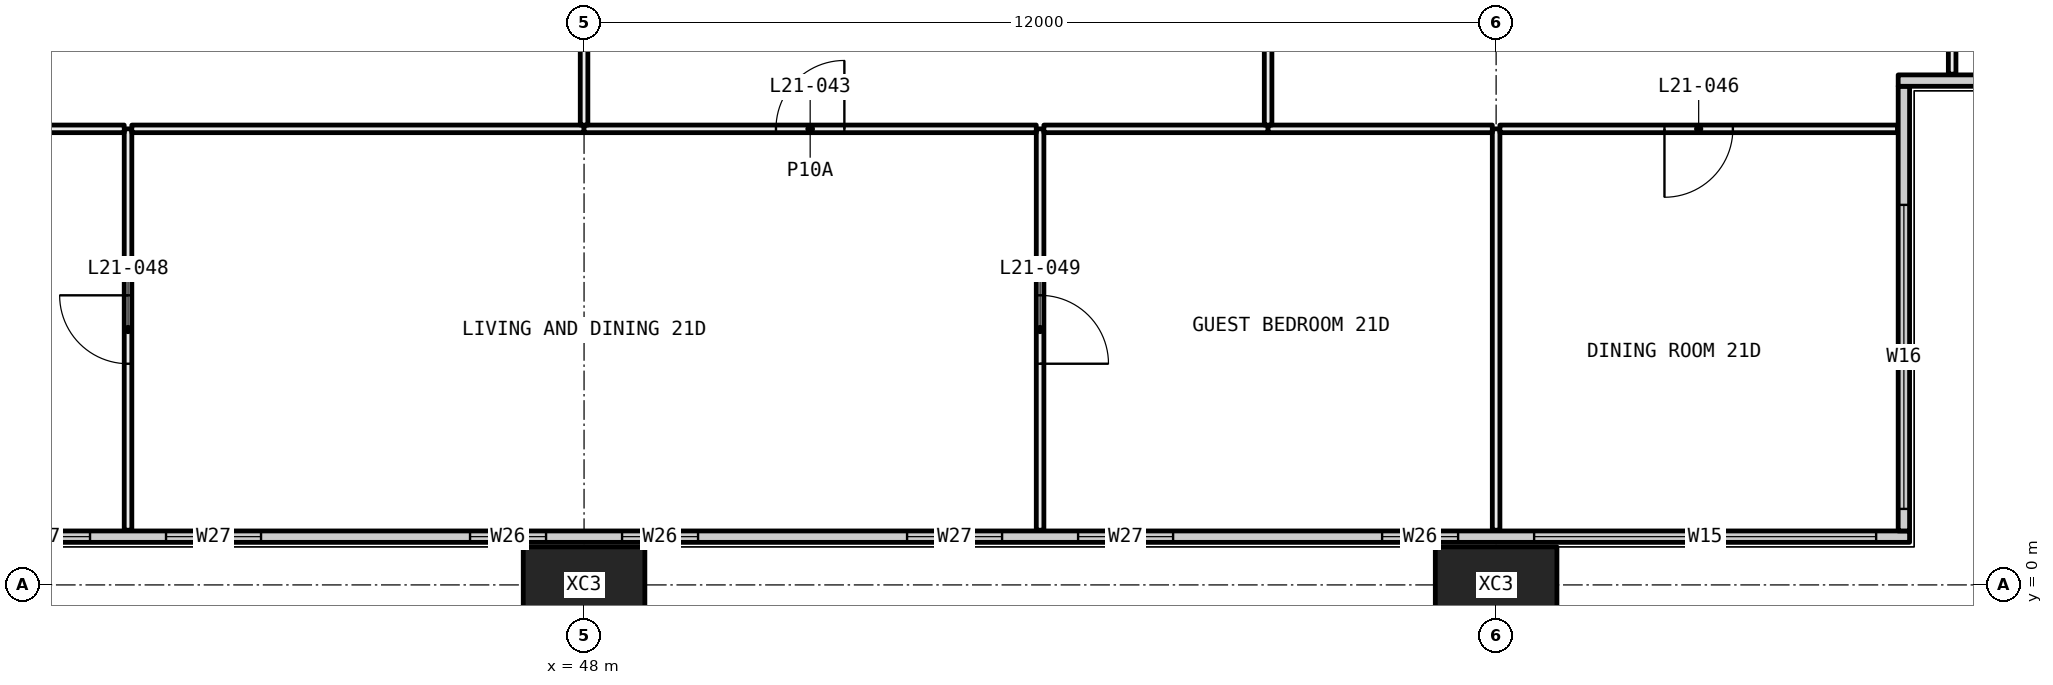
"""IFC4 building model, lengths in metres.
Left out: names, types, materials, properties, quantities, classifications, styles, units other than length and angle.
Written with IfcOpenShell. Run it as: python <this file> out.ifc"""

import sys

from ifc_helpers import new_model, si_unit, direction, frame, frame_2d, origin, origin_2d, place, context, subcontext, project, spatial, rectangle, hollow_rectangle, extrude, element, fill, save


model = new_model("IFC4")
c1 = context("Model", 3, precision=1e-05, world=origin(), true_north=direction((0.0, 1.0)))
c2 = subcontext(c1, "Body", "Model", "MODEL_VIEW")
j1 = project(units=[si_unit("LENGTHUNIT", "METRE"), si_unit("PLANEANGLEUNIT", "RADIAN")], contexts=[c1])
p1 = place(None, origin())
s1 = spatial("IfcSite", under=j1, at=p1, CompositionType="ELEMENT")
p2 = place(p1, origin())
s2 = spatial("IfcBuilding", under=s1, at=p2, CompositionType="ELEMENT")
p3 = place(p2, frame((0.0, 0.0, 85.2)))
s3 = spatial("IfcBuildingStorey", under=s2, at=p3, CompositionType="ELEMENT", Elevation=85.2)
for number, where, z_axis, x_axis in (
    (1, (48.0, 0.0, -0.4), (0.0, 0.0, 1.0), (1.0, 0.0, 0.0)),
    (2, (60.0, 0.0, -0.4), (0.0, 0.0, 1.0), (1.0, 0.0, 0.0)),
):
    element("IfcColumn", number, at=place(p3, frame(where, z_axis=z_axis, x_axis=x_axis)), inside=s3, PredefinedType="COLUMN", context=c2, shape_type="SweptSolid", body=[
        extrude(hollow_rectangle(XDim=1.6, YDim=1.0, WallThickness=0.065, at=origin_2d()), origin(), (0.0, 0.0, 1.0), 3.45),
    ])
p4 = place(p3, frame((6.56, 0.635, 0.0), z_axis=(0.0, 0.0, 1.0), x_axis=(1.0, 0.0, 0.0)))
e3 = element("IfcWall", 3, at=p4, inside=s3, PredefinedType="ELEMENTEDWALL", context=c2, shape_type="SweptSolid", body=[
    extrude(rectangle(XDim=58.88, YDim=0.15, at=frame_2d((29.44, 0.0))), origin(), (0.0, 0.0, 1.0), 3.05),
])
p5 = place(p4, frame((0.44, 0.0, 0.45)))
e4 = element("IfcOpeningElement", 4, at=p5, cuts=e3, PredefinedType="OPENING", context=c2, shape_type="SweptSolid", body=[
    extrude(rectangle(XDim=4.5, YDim=2.55, at=frame_2d((2.25, 1.275))), frame((0.0, 0.085, 0.0), z_axis=(0.0, -1.0, 0.0), x_axis=(1.0, 0.0, 0.0)), (0.0, 0.0, 1.0), 0.17),
])
p6 = place(p4, frame((5.94, 0.0, 0.45)))
e5 = element("IfcOpeningElement", 5, at=p6, cuts=e3, PredefinedType="OPENING", context=c2, shape_type="SweptSolid", body=[
    extrude(rectangle(XDim=1.0, YDim=2.55, at=frame_2d((0.5, 1.275))), frame((0.0, 0.085, 0.0), z_axis=(0.0, -1.0, 0.0), x_axis=(1.0, 0.0, 0.0)), (0.0, 0.0, 1.0), 0.17),
])
p7 = place(p4, frame((9.69, 0.0, 0.45)))
e6 = element("IfcOpeningElement", 6, at=p7, cuts=e3, PredefinedType="OPENING", context=c2, shape_type="SweptSolid", body=[
    extrude(rectangle(XDim=1.25, YDim=2.55, at=frame_2d((0.625, 1.275))), frame((0.0, 0.085, 0.0), z_axis=(0.0, -1.0, 0.0), x_axis=(1.0, 0.0, 0.0)), (0.0, 0.0, 1.0), 0.17),
])
p8 = place(p4, frame((11.94, 0.0, 0.45)))
e7 = element("IfcOpeningElement", 7, at=p8, cuts=e3, PredefinedType="OPENING", context=c2, shape_type="SweptSolid", body=[
    extrude(rectangle(XDim=1.25, YDim=2.55, at=frame_2d((0.625, 1.275))), frame((0.0, 0.085, 0.0), z_axis=(0.0, -1.0, 0.0), x_axis=(1.0, 0.0, 0.0)), (0.0, 0.0, 1.0), 0.17),
])
p9 = place(p4, frame((15.94, 0.0, 0.45)))
e8 = element("IfcOpeningElement", 8, at=p9, cuts=e3, PredefinedType="OPENING", context=c2, shape_type="SweptSolid", body=[
    extrude(rectangle(XDim=1.0, YDim=2.55, at=frame_2d((0.5, 1.275))), frame((0.0, 0.085, 0.0), z_axis=(0.0, -1.0, 0.0), x_axis=(1.0, 0.0, 0.0)), (0.0, 0.0, 1.0), 0.17),
])
p10 = place(p4, frame((17.94, 0.0, 0.45)))
e9 = element("IfcOpeningElement", 9, at=p10, cuts=e3, PredefinedType="OPENING", context=c2, shape_type="SweptSolid", body=[
    extrude(rectangle(XDim=1.0, YDim=2.55, at=frame_2d((0.5, 1.275))), frame((0.0, 0.085, 0.0), z_axis=(0.0, -1.0, 0.0), x_axis=(1.0, 0.0, 0.0)), (0.0, 0.0, 1.0), 0.17),
])
p11 = place(p4, frame((21.69, 0.0, 0.45)))
e10 = element("IfcOpeningElement", 10, at=p11, cuts=e3, PredefinedType="OPENING", context=c2, shape_type="SweptSolid", body=[
    extrude(rectangle(XDim=1.25, YDim=2.55, at=frame_2d((0.625, 1.275))), frame((0.0, 0.085, 0.0), z_axis=(0.0, -1.0, 0.0), x_axis=(1.0, 0.0, 0.0)), (0.0, 0.0, 1.0), 0.17),
])
p12 = place(p4, frame((23.94, 0.0, 0.45)))
e11 = element("IfcOpeningElement", 11, at=p12, cuts=e3, PredefinedType="OPENING", context=c2, shape_type="SweptSolid", body=[
    extrude(rectangle(XDim=1.25, YDim=2.55, at=frame_2d((0.625, 1.275))), frame((0.0, 0.085, 0.0), z_axis=(0.0, -1.0, 0.0), x_axis=(1.0, 0.0, 0.0)), (0.0, 0.0, 1.0), 0.17),
])
p13 = place(p4, frame((27.94, 0.0, 0.45)))
e12 = element("IfcOpeningElement", 12, at=p13, cuts=e3, PredefinedType="OPENING", context=c2, shape_type="SweptSolid", body=[
    extrude(rectangle(XDim=1.0, YDim=2.55, at=frame_2d((0.5, 1.275))), frame((0.0, 0.085, 0.0), z_axis=(0.0, -1.0, 0.0), x_axis=(1.0, 0.0, 0.0)), (0.0, 0.0, 1.0), 0.17),
])
p14 = place(p4, frame((29.94, 0.0, 0.45)))
e13 = element("IfcOpeningElement", 13, at=p14, cuts=e3, PredefinedType="OPENING", context=c2, shape_type="SweptSolid", body=[
    extrude(rectangle(XDim=1.0, YDim=2.55, at=frame_2d((0.5, 1.275))), frame((0.0, 0.085, 0.0), z_axis=(0.0, -1.0, 0.0), x_axis=(1.0, 0.0, 0.0)), (0.0, 0.0, 1.0), 0.17),
])
p15 = place(p4, frame((33.69, 0.0, 0.45)))
e14 = element("IfcOpeningElement", 14, at=p15, cuts=e3, PredefinedType="OPENING", context=c2, shape_type="SweptSolid", body=[
    extrude(rectangle(XDim=1.25, YDim=2.55, at=frame_2d((0.625, 1.275))), frame((0.0, 0.085, 0.0), z_axis=(0.0, -1.0, 0.0), x_axis=(1.0, 0.0, 0.0)), (0.0, 0.0, 1.0), 0.17),
])
p16 = place(p4, frame((35.94, 0.0, 0.45)))
e15 = element("IfcOpeningElement", 15, at=p16, cuts=e3, PredefinedType="OPENING", context=c2, shape_type="SweptSolid", body=[
    extrude(rectangle(XDim=1.25, YDim=2.55, at=frame_2d((0.625, 1.275))), frame((0.0, 0.085, 0.0), z_axis=(0.0, -1.0, 0.0), x_axis=(1.0, 0.0, 0.0)), (0.0, 0.0, 1.0), 0.17),
])
p17 = place(p4, frame((39.94, 0.0, 0.45)))
e16 = element("IfcOpeningElement", 16, at=p17, cuts=e3, PredefinedType="OPENING", context=c2, shape_type="SweptSolid", body=[
    extrude(rectangle(XDim=1.0, YDim=2.55, at=frame_2d((0.5, 1.275))), frame((0.0, 0.085, 0.0), z_axis=(0.0, -1.0, 0.0), x_axis=(1.0, 0.0, 0.0)), (0.0, 0.0, 1.0), 0.17),
])
p18 = place(p4, frame((41.94, 0.0, 0.45)))
e17 = element("IfcOpeningElement", 17, at=p18, cuts=e3, PredefinedType="OPENING", context=c2, shape_type="SweptSolid", body=[
    extrude(rectangle(XDim=1.0, YDim=2.55, at=frame_2d((0.5, 1.275))), frame((0.0, 0.085, 0.0), z_axis=(0.0, -1.0, 0.0), x_axis=(1.0, 0.0, 0.0)), (0.0, 0.0, 1.0), 0.17),
])
p19 = place(p4, frame((45.69, 0.0, 0.45)))
e18 = element("IfcOpeningElement", 18, at=p19, cuts=e3, PredefinedType="OPENING", context=c2, shape_type="SweptSolid", body=[
    extrude(rectangle(XDim=1.25, YDim=2.55, at=frame_2d((0.625, 1.275))), frame((0.0, 0.085, 0.0), z_axis=(0.0, -1.0, 0.0), x_axis=(1.0, 0.0, 0.0)), (0.0, 0.0, 1.0), 0.17),
])
p20 = place(p4, frame((47.94, 0.0, 0.45)))
e19 = element("IfcOpeningElement", 19, at=p20, cuts=e3, PredefinedType="OPENING", context=c2, shape_type="SweptSolid", body=[
    extrude(rectangle(XDim=1.25, YDim=2.55, at=frame_2d((0.625, 1.275))), frame((0.0, 0.085, 0.0), z_axis=(0.0, -1.0, 0.0), x_axis=(1.0, 0.0, 0.0)), (0.0, 0.0, 1.0), 0.17),
])
p21 = place(p4, frame((51.94, 0.0, 0.45)))
e20 = element("IfcOpeningElement", 20, at=p21, cuts=e3, PredefinedType="OPENING", context=c2, shape_type="SweptSolid", body=[
    extrude(rectangle(XDim=1.0, YDim=2.55, at=frame_2d((0.5, 1.275))), frame((0.0, 0.085, 0.0), z_axis=(0.0, -1.0, 0.0), x_axis=(1.0, 0.0, 0.0)), (0.0, 0.0, 1.0), 0.17),
])
p22 = place(p4, frame((53.94, 0.0, 0.45)))
e21 = element("IfcOpeningElement", 21, at=p22, cuts=e3, PredefinedType="OPENING", context=c2, shape_type="SweptSolid", body=[
    extrude(rectangle(XDim=4.5, YDim=2.55, at=frame_2d((2.25, 1.275))), frame((0.0, 0.085, 0.0), z_axis=(0.0, -1.0, 0.0), x_axis=(1.0, 0.0, 0.0)), (0.0, 0.0, 1.0), 0.17),
])
p23 = place(p3, frame((65.365, 0.71, 0.0), z_axis=(0.0, 0.0, 1.0), x_axis=(0.0, 1.0, 0.0)))
e22 = element("IfcWall", 22, at=p23, inside=s3, PredefinedType="ELEMENTEDWALL", context=c2, shape_type="SweptSolid", body=[
    extrude(rectangle(XDim=5.85, YDim=0.15, at=frame_2d((2.925, 0.0))), origin(), (0.0, 0.0, 1.0), 3.05),
])
p24 = place(p23, frame((0.29, 0.0, 0.45)))
e23 = element("IfcOpeningElement", 23, at=p24, cuts=e22, PredefinedType="OPENING", context=c2, shape_type="SweptSolid", body=[
    extrude(rectangle(XDim=4.0, YDim=2.55, at=frame_2d((2.0, 1.275))), frame((0.0, 0.085, 0.0), z_axis=(0.0, -1.0, 0.0), x_axis=(1.0, 0.0, 0.0)), (0.0, 0.0, 1.0), 0.17),
])
p25 = place(p3, frame((65.29, 6.635, 0.0), z_axis=(0.0, 0.0, 1.0), x_axis=(1.0, 0.0, 0.0)))
e24 = element("IfcWall", 24, at=p25, inside=s3, PredefinedType="ELEMENTEDWALL", context=c2, shape_type="SweptSolid", body=[
    extrude(rectangle(XDim=6.15, YDim=0.15, at=frame_2d((3.075, 0.0))), origin(), (0.0, 0.0, 1.0), 3.05),
])
p26 = place(p25, frame((1.71, 0.0, 0.45)))
e25 = element("IfcOpeningElement", 25, at=p26, cuts=e24, PredefinedType="OPENING", context=c2, shape_type="SweptSolid", body=[
    extrude(rectangle(XDim=4.0, YDim=2.55, at=frame_2d((2.0, 1.275))), frame((0.0, 0.085, 0.0), z_axis=(0.0, -1.0, 0.0), x_axis=(1.0, 0.0, 0.0)), (0.0, 0.0, 1.0), 0.17),
])
p27 = place(p3, frame((42.0, 0.72, 0.0), z_axis=(0.0, 0.0, 1.0), x_axis=(0.0, 1.0, 0.0)))
e26 = element("IfcWall", 26, at=p27, inside=s3, PredefinedType="PARTITIONING", context=c2, shape_type="SweptSolid", body=[
    extrude(rectangle(XDim=5.28, YDim=0.1, at=frame_2d((2.64, 0.0))), origin(), (0.0, 0.0, 1.0), 3.05),
])
p28 = place(p27, frame((2.19, 0.0, 0.0)))
e27 = element("IfcOpeningElement", 27, at=p28, cuts=e26, PredefinedType="OPENING", context=c2, shape_type="SweptSolid", body=[
    extrude(rectangle(XDim=0.9, YDim=2.1, at=frame_2d((0.45, 1.05))), frame((0.0, 0.06, 0.0), z_axis=(0.0, -1.0, 0.0), x_axis=(1.0, 0.0, 0.0)), (0.0, 0.0, 1.0), 0.12),
])
p29 = place(p3, frame((41.95, 6.0, 0.0), z_axis=(0.0, 0.0, 1.0), x_axis=(-1.0, 0.0, 0.0)))
e28 = element("IfcWall", 28, at=p29, inside=s3, PredefinedType="PARTITIONING", context=c2, shape_type="SweptSolid", body=[
    extrude(rectangle(XDim=2.875, YDim=0.1, at=frame_2d((1.438, 0.0))), origin(), (0.0, 0.0, 1.0), 3.05),
])
p30 = place(p3, frame((54.0, 0.72, 0.0), z_axis=(0.0, 0.0, 1.0), x_axis=(0.0, 1.0, 0.0)))
e29 = element("IfcWall", 29, at=p30, inside=s3, PredefinedType="PARTITIONING", context=c2, shape_type="SweptSolid", body=[
    extrude(rectangle(XDim=5.28, YDim=0.1, at=frame_2d((2.64, 0.0))), origin(), (0.0, 0.0, 1.0), 3.05),
])
p31 = place(p30, frame((2.19, 0.0, 0.0)))
e30 = element("IfcOpeningElement", 30, at=p31, cuts=e29, PredefinedType="OPENING", context=c2, shape_type="SweptSolid", body=[
    extrude(rectangle(XDim=0.9, YDim=2.1, at=frame_2d((0.45, 1.05))), frame((0.0, 0.06, 0.0), z_axis=(0.0, -1.0, 0.0), x_axis=(1.0, 0.0, 0.0)), (0.0, 0.0, 1.0), 0.12),
])
p32 = place(p3, frame((48.0, 6.0, 0.0), z_axis=(0.0, 0.0, 1.0), x_axis=(-1.0, 0.0, 0.0)))
e31 = element("IfcWall", 31, at=p32, inside=s3, PredefinedType="PARTITIONING", context=c2, shape_type="SweptSolid", body=[
    extrude(rectangle(XDim=5.95, YDim=0.1, at=frame_2d((2.975, 0.0))), origin(), (0.0, 0.0, 1.0), 2.45),
])
p33 = place(p3, frame((53.95, 6.0, 0.0), z_axis=(0.0, 0.0, 1.0), x_axis=(-1.0, 0.0, 0.0)))
e32 = element("IfcWall", 32, at=p33, inside=s3, PredefinedType="PARTITIONING", context=c2, shape_type="SweptSolid", body=[
    extrude(rectangle(XDim=5.95, YDim=0.1, at=frame_2d((2.975, 0.0))), origin(), (0.0, 0.0, 1.0), 2.45),
])
p34 = place(p33, frame((2.525, 0.0, 0.0)))
e33 = element("IfcOpeningElement", 33, at=p34, cuts=e32, PredefinedType="OPENING", context=c2, shape_type="SweptSolid", body=[
    extrude(rectangle(XDim=0.9, YDim=2.1, at=frame_2d((0.45, 1.05))), frame((0.0, 0.06, 0.0), z_axis=(0.0, -1.0, 0.0), x_axis=(1.0, 0.0, 0.0)), (0.0, 0.0, 1.0), 0.12),
])
p35 = place(p3, frame((60.0, 0.72, 0.0), z_axis=(0.0, 0.0, 1.0), x_axis=(0.0, 1.0, 0.0)))
e34 = element("IfcWall", 34, at=p35, inside=s3, PredefinedType="PARTITIONING", context=c2, shape_type="SweptSolid", body=[
    extrude(rectangle(XDim=5.28, YDim=0.1, at=frame_2d((2.64, 0.0))), origin(), (0.0, 0.0, 1.0), 2.45),
])
p36 = place(p3, frame((57.0, 6.0, 0.0), z_axis=(0.0, 0.0, 1.0), x_axis=(-1.0, 0.0, 0.0)))
e35 = element("IfcWall", 35, at=p36, inside=s3, PredefinedType="PARTITIONING", context=c2, shape_type="SweptSolid", body=[
    extrude(rectangle(XDim=2.95, YDim=0.1, at=frame_2d((1.475, 0.0))), origin(), (0.0, 0.0, 1.0), 3.05),
])
p37 = place(p3, frame((59.95, 6.0, 0.0), z_axis=(0.0, 0.0, 1.0), x_axis=(-1.0, 0.0, 0.0)))
e36 = element("IfcWall", 36, at=p37, inside=s3, PredefinedType="PARTITIONING", context=c2, shape_type="SweptSolid", body=[
    extrude(rectangle(XDim=2.95, YDim=0.1, at=frame_2d((1.475, 0.0))), origin(), (0.0, 0.0, 1.0), 2.45),
])
p38 = place(p3, frame((65.28, 6.0, 0.0), z_axis=(0.0, 0.0, 1.0), x_axis=(-1.0, 0.0, 0.0)))
e37 = element("IfcWall", 37, at=p38, inside=s3, PredefinedType="PARTITIONING", context=c2, shape_type="SweptSolid", body=[
    extrude(rectangle(XDim=5.23, YDim=0.1, at=frame_2d((2.615, 0.0))), origin(), (0.0, 0.0, 1.0), 2.45),
])
p39 = place(p38, frame((2.165, 0.0, 0.0)))
e38 = element("IfcOpeningElement", 38, at=p39, cuts=e37, PredefinedType="OPENING", context=c2, shape_type="SweptSolid", body=[
    extrude(rectangle(XDim=0.9, YDim=2.1, at=frame_2d((0.45, 1.05))), frame((0.0, 0.06, 0.0), z_axis=(0.0, -1.0, 0.0), x_axis=(1.0, 0.0, 0.0)), (0.0, 0.0, 1.0), 0.12),
])
p40 = place(p3, frame((48.0, 6.05, 0.0), z_axis=(0.0, 0.0, 1.0), x_axis=(0.0, 1.0, 0.0)))
e39 = element("IfcWall", 39, at=p40, inside=s3, PredefinedType="PARTITIONING", context=c2, shape_type="SweptSolid", body=[
    extrude(rectangle(XDim=5.15, YDim=0.1, at=frame_2d((2.575, 0.0))), origin(), (0.0, 0.0, 1.0), 2.45),
])
p41 = place(p40, frame((2.125, 0.0, 0.0)))
e40 = element("IfcOpeningElement", 40, at=p41, cuts=e39, PredefinedType="OPENING", context=c2, shape_type="SweptSolid", body=[
    extrude(rectangle(XDim=0.9, YDim=2.1, at=frame_2d((0.45, 1.05))), frame((0.0, 0.06, 0.0), z_axis=(0.0, -1.0, 0.0), x_axis=(1.0, 0.0, 0.0)), (0.0, 0.0, 1.0), 0.12),
])
p42 = place(p3, frame((57.0, 6.05, 0.0), z_axis=(0.0, 0.0, 1.0), x_axis=(0.0, 1.0, 0.0)))
e41 = element("IfcWall", 41, at=p42, inside=s3, PredefinedType="PARTITIONING", context=c2, shape_type="SweptSolid", body=[
    extrude(rectangle(XDim=5.95, YDim=0.1, at=frame_2d((2.975, 0.0))), origin(), (0.0, 0.0, 1.0), 2.45),
])
p43 = place(p42, frame((2.525, 0.0, 0.0)))
e42 = element("IfcOpeningElement", 42, at=p43, cuts=e41, PredefinedType="OPENING", context=c2, shape_type="SweptSolid", body=[
    extrude(rectangle(XDim=0.9, YDim=2.1, at=frame_2d((0.45, 1.05))), frame((0.0, 0.06, 0.0), z_axis=(0.0, -1.0, 0.0), x_axis=(1.0, 0.0, 0.0)), (0.0, 0.0, 1.0), 0.12),
])
p44 = place(p3, frame((66.0, 6.72, 0.0), z_axis=(0.0, 0.0, 1.0), x_axis=(0.0, 1.0, 0.0)))
e43 = element("IfcWall", 43, at=p44, inside=s3, PredefinedType="PARTITIONING", context=c2, shape_type="SweptSolid", body=[
    extrude(rectangle(XDim=5.205, YDim=0.1, at=frame_2d((2.603, 0.0))), origin(), (0.0, 0.0, 1.0), 2.45),
])
p45 = place(p44, frame((2.153, 0.0, 0.0)))
e44 = element("IfcOpeningElement", 44, at=p45, cuts=e43, PredefinedType="OPENING", context=c2, shape_type="SweptSolid", body=[
    extrude(rectangle(XDim=0.9, YDim=2.1, at=frame_2d((0.45, 1.05))), frame((0.0, 0.06, 0.0), z_axis=(0.0, -1.0, 0.0), x_axis=(1.0, 0.0, 0.0)), (0.0, 0.0, 1.0), 0.12),
])
p46 = place(p15, origin())
e45 = element("IfcWindow", 45, at=p46, inside=s3, PartitioningType="SINGLE_PANEL", PredefinedType="WINDOW", context=c2, shape_type="SweptSolid", body=[
    extrude(rectangle(XDim=1.25, YDim=2.55, at=frame_2d((0.625, 1.275))), frame((0.0, 0.03, 0.0), z_axis=(0.0, -1.0, 0.0), x_axis=(1.0, 0.0, 0.0)), (0.0, 0.0, 1.0), 0.06),
])
fill(e14, e45)
p47 = place(p16, origin())
e46 = element("IfcWindow", 46, at=p47, inside=s3, PartitioningType="SINGLE_PANEL", PredefinedType="WINDOW", context=c2, shape_type="SweptSolid", body=[
    extrude(rectangle(XDim=1.25, YDim=2.55, at=frame_2d((0.625, 1.275))), frame((0.0, 0.03, 0.0), z_axis=(0.0, -1.0, 0.0), x_axis=(1.0, 0.0, 0.0)), (0.0, 0.0, 1.0), 0.06),
])
fill(e15, e46)
p48 = place(p17, origin())
e47 = element("IfcWindow", 47, at=p48, inside=s3, PartitioningType="SINGLE_PANEL", PredefinedType="WINDOW", context=c2, shape_type="SweptSolid", body=[
    extrude(rectangle(XDim=1.0, YDim=2.55, at=frame_2d((0.5, 1.275))), frame((0.0, 0.03, 0.0), z_axis=(0.0, -1.0, 0.0), x_axis=(1.0, 0.0, 0.0)), (0.0, 0.0, 1.0), 0.06),
])
fill(e16, e47)
p49 = place(p18, origin())
e48 = element("IfcWindow", 48, at=p49, inside=s3, PartitioningType="SINGLE_PANEL", PredefinedType="WINDOW", context=c2, shape_type="SweptSolid", body=[
    extrude(rectangle(XDim=1.0, YDim=2.55, at=frame_2d((0.5, 1.275))), frame((0.0, 0.03, 0.0), z_axis=(0.0, -1.0, 0.0), x_axis=(1.0, 0.0, 0.0)), (0.0, 0.0, 1.0), 0.06),
])
fill(e17, e48)
p50 = place(p19, origin())
e49 = element("IfcWindow", 49, at=p50, inside=s3, PartitioningType="SINGLE_PANEL", PredefinedType="WINDOW", context=c2, shape_type="SweptSolid", body=[
    extrude(rectangle(XDim=1.25, YDim=2.55, at=frame_2d((0.625, 1.275))), frame((0.0, 0.03, 0.0), z_axis=(0.0, -1.0, 0.0), x_axis=(1.0, 0.0, 0.0)), (0.0, 0.0, 1.0), 0.06),
])
fill(e18, e49)
p51 = place(p20, origin())
e50 = element("IfcWindow", 50, at=p51, inside=s3, PartitioningType="SINGLE_PANEL", PredefinedType="WINDOW", context=c2, shape_type="SweptSolid", body=[
    extrude(rectangle(XDim=1.25, YDim=2.55, at=frame_2d((0.625, 1.275))), frame((0.0, 0.03, 0.0), z_axis=(0.0, -1.0, 0.0), x_axis=(1.0, 0.0, 0.0)), (0.0, 0.0, 1.0), 0.06),
])
fill(e19, e50)
p52 = place(p21, origin())
e51 = element("IfcWindow", 51, at=p52, inside=s3, PartitioningType="SINGLE_PANEL", PredefinedType="WINDOW", context=c2, shape_type="SweptSolid", body=[
    extrude(rectangle(XDim=1.0, YDim=2.55, at=frame_2d((0.5, 1.275))), frame((0.0, 0.03, 0.0), z_axis=(0.0, -1.0, 0.0), x_axis=(1.0, 0.0, 0.0)), (0.0, 0.0, 1.0), 0.06),
])
fill(e20, e51)
p53 = place(p22, origin())
e52 = element("IfcWindow", 52, at=p53, inside=s3, PartitioningType="SINGLE_PANEL", PredefinedType="WINDOW", context=c2, shape_type="SweptSolid", body=[
    extrude(rectangle(XDim=4.5, YDim=2.55, at=frame_2d((2.25, 1.275))), frame((0.0, 0.03, 0.0), z_axis=(0.0, -1.0, 0.0), x_axis=(1.0, 0.0, 0.0)), (0.0, 0.0, 1.0), 0.06),
])
fill(e21, e52)
p54 = place(p24, origin())
e53 = element("IfcWindow", 53, at=p54, inside=s3, PartitioningType="SINGLE_PANEL", PredefinedType="WINDOW", context=c2, shape_type="SweptSolid", body=[
    extrude(rectangle(XDim=4.0, YDim=2.55, at=frame_2d((2.0, 1.275))), frame((0.0, 0.03, 0.0), z_axis=(0.0, -1.0, 0.0), x_axis=(1.0, 0.0, 0.0)), (0.0, 0.0, 1.0), 0.06),
])
fill(e23, e53)
p55 = place(p34, frame((0.9, 0.0, 0.0), x_axis=(-1.0, 0.0, 0.0)))
e54 = element("IfcDoor", 54, at=p55, inside=s3, OperationType="SINGLE_SWING_LEFT", PredefinedType="DOOR", context=c2, shape_type="SweptSolid", body=[
    extrude(rectangle(XDim=0.9, YDim=2.1, at=frame_2d((0.45, 1.05))), frame((0.0, 0.025, 0.0), z_axis=(0.0, -1.0, 0.0), x_axis=(1.0, 0.0, 0.0)), (0.0, 0.0, 1.0), 0.05),
])
fill(e33, e54)
p56 = place(p39, origin())
e55 = element("IfcDoor", 55, at=p56, inside=s3, OperationType="SINGLE_SWING_LEFT", PredefinedType="DOOR", context=c2, shape_type="SweptSolid", body=[
    extrude(rectangle(XDim=0.9, YDim=2.1, at=frame_2d((0.45, 1.05))), frame((0.0, 0.025, 0.0), z_axis=(0.0, -1.0, 0.0), x_axis=(1.0, 0.0, 0.0)), (0.0, 0.0, 1.0), 0.05),
])
fill(e38, e55)
p57 = place(p28, origin())
e56 = element("IfcDoor", 56, at=p57, inside=s3, OperationType="SINGLE_SWING_LEFT", PredefinedType="DOOR", context=c2, shape_type="SweptSolid", body=[
    extrude(rectangle(XDim=0.9, YDim=2.1, at=frame_2d((0.45, 1.05))), frame((0.0, 0.025, 0.0), z_axis=(0.0, -1.0, 0.0), x_axis=(1.0, 0.0, 0.0)), (0.0, 0.0, 1.0), 0.05),
])
fill(e27, e56)
p58 = place(p31, frame((0.9, 0.0, 0.0), x_axis=(-1.0, 0.0, 0.0)))
e57 = element("IfcDoor", 57, at=p58, inside=s3, OperationType="SINGLE_SWING_LEFT", PredefinedType="DOOR", context=c2, shape_type="SweptSolid", body=[
    extrude(rectangle(XDim=0.9, YDim=2.1, at=frame_2d((0.45, 1.05))), frame((0.0, 0.025, 0.0), z_axis=(0.0, -1.0, 0.0), x_axis=(1.0, 0.0, 0.0)), (0.0, 0.0, 1.0), 0.05),
])
fill(e30, e57)
save(model, sys.argv[1])
